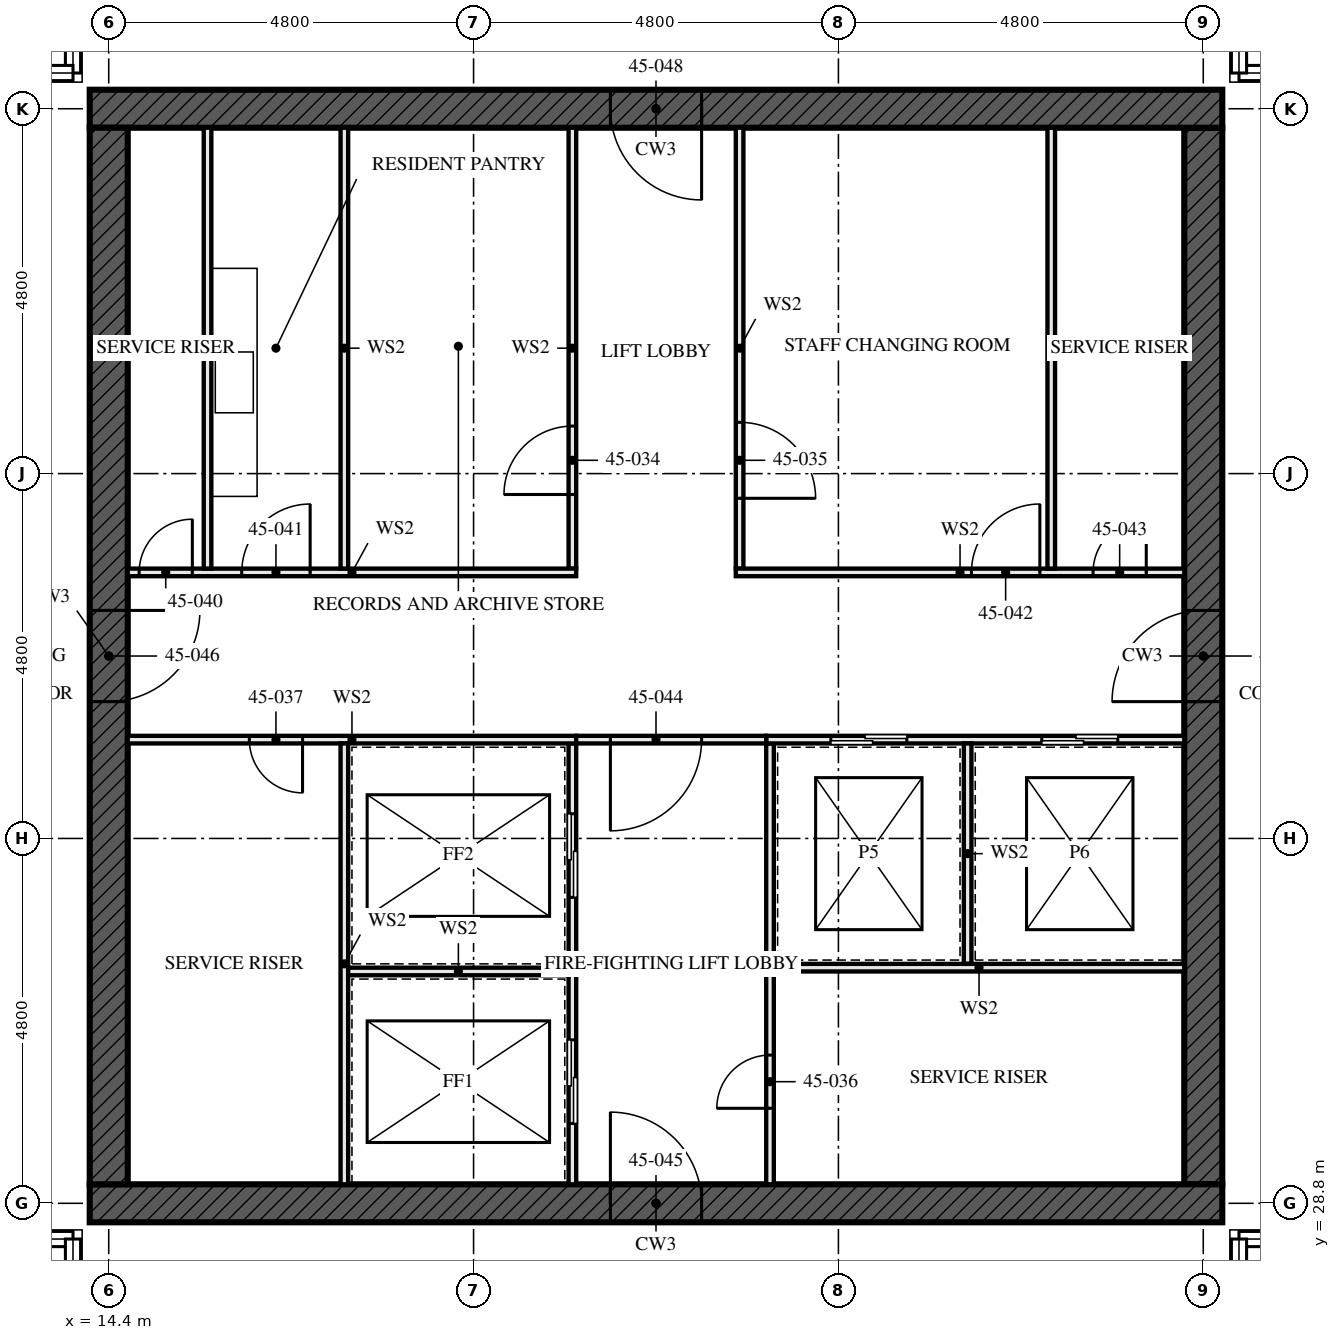
"""IFC4 building model, lengths in metres.
Left out: names, types, materials, properties, quantities, classifications, styles, units other than length and angle.
Written with IfcOpenShell. Run it as: python <this file> out.ifc"""

import sys

from ifc_helpers import new_model, si_unit, direction, frame, frame_2d, origin, place, context, subcontext, project, spatial, rectangle, extrude, element, fill, save


model = new_model("IFC4")
c1 = context("Model", 3, precision=1e-05, world=origin(), true_north=direction((0.0, 1.0)))
c2 = subcontext(c1, "Body", "Model", "MODEL_VIEW")
j1 = project(units=[si_unit("LENGTHUNIT", "METRE"), si_unit("PLANEANGLEUNIT", "RADIAN")], contexts=[c1])
p1 = place(None, origin())
s1 = spatial("IfcSite", under=j1, at=p1, CompositionType="ELEMENT")
p2 = place(p1, origin())
s2 = spatial("IfcBuilding", under=s1, at=p2, CompositionType="ELEMENT")
p3 = place(p2, frame((0.0, 0.0, 165.5)))
s3 = spatial("IfcBuildingStorey", under=s2, at=p3, CompositionType="ELEMENT", Elevation=165.5)
p4 = place(p3, frame((14.15, 28.8, -0.17), z_axis=(0.0, 0.0, 1.0), x_axis=(1.0, 0.0, 0.0)))
e1 = element("IfcWall", 1, at=p4, inside=s3, PredefinedType="SHEAR", context=c2, shape_type="SweptSolid", body=[
    extrude(rectangle(XDim=14.9, YDim=0.5, at=frame_2d((7.45, 0.0))), origin(), (0.0, 0.0, 1.0), 3.5),
])
p5 = place(p4, frame((6.85, 0.0, 0.17)))
e2 = element("IfcOpeningElement", 2, at=p5, cuts=e1, PredefinedType="OPENING", context=c2, shape_type="SweptSolid", body=[
    extrude(rectangle(XDim=1.2, YDim=2.1, at=frame_2d((0.6, 1.05))), frame((0.0, 0.26, 0.0), z_axis=(0.0, -1.0, 0.0), x_axis=(1.0, 0.0, 0.0)), (0.0, 0.0, 1.0), 0.521),
])
p6 = place(p3, frame((29.05, 43.2, -0.17), z_axis=(0.0, 0.0, 1.0), x_axis=(-1.0, 0.0, 0.0)))
e3 = element("IfcWall", 3, at=p6, inside=s3, PredefinedType="SHEAR", context=c2, shape_type="SweptSolid", body=[
    extrude(rectangle(XDim=14.9, YDim=0.5, at=frame_2d((7.45, 0.0))), origin(), (0.0, 0.0, 1.0), 3.5),
])
p7 = place(p6, frame((6.85, 0.0, 0.17)))
e4 = element("IfcOpeningElement", 4, at=p7, cuts=e3, PredefinedType="OPENING", context=c2, shape_type="SweptSolid", body=[
    extrude(rectangle(XDim=1.2, YDim=2.1, at=frame_2d((0.6, 1.05))), frame((0.0, 0.26, 0.0), z_axis=(0.0, -1.0, 0.0), x_axis=(1.0, 0.0, 0.0)), (0.0, 0.0, 1.0), 0.521),
])
p8 = place(p3, frame((14.4, 42.95, -0.17), z_axis=(0.0, 0.0, 1.0), x_axis=(0.0, -1.0, 0.0)))
e5 = element("IfcWall", 5, at=p8, inside=s3, PredefinedType="SHEAR", context=c2, shape_type="SweptSolid", body=[
    extrude(rectangle(XDim=13.9, YDim=0.5, at=frame_2d((6.95, 0.0))), origin(), (0.0, 0.0, 1.0), 3.5),
])
p9 = place(p8, frame((6.35, 0.0, 0.17)))
e6 = element("IfcOpeningElement", 6, at=p9, cuts=e5, PredefinedType="OPENING", context=c2, shape_type="SweptSolid", body=[
    extrude(rectangle(XDim=1.2, YDim=2.1, at=frame_2d((0.6, 1.05))), frame((0.0, 0.26, 0.0), z_axis=(0.0, -1.0, 0.0), x_axis=(1.0, 0.0, 0.0)), (0.0, 0.0, 1.0), 0.521),
])
p10 = place(p3, frame((28.8, 29.05, -0.17), z_axis=(0.0, 0.0, 1.0), x_axis=(0.0, 1.0, 0.0)))
e7 = element("IfcWall", 7, at=p10, inside=s3, PredefinedType="SHEAR", context=c2, shape_type="SweptSolid", body=[
    extrude(rectangle(XDim=13.9, YDim=0.5, at=frame_2d((6.95, 0.0))), origin(), (0.0, 0.0, 1.0), 3.5),
])
p11 = place(p10, frame((6.35, 0.0, 0.17)))
e8 = element("IfcOpeningElement", 8, at=p11, cuts=e7, PredefinedType="OPENING", context=c2, shape_type="SweptSolid", body=[
    extrude(rectangle(XDim=1.2, YDim=2.1, at=frame_2d((0.6, 1.05))), frame((0.0, 0.26, 0.0), z_axis=(0.0, -1.0, 0.0), x_axis=(1.0, 0.0, 0.0)), (0.0, 0.0, 1.0), 0.521),
])
for number, where, z_axis, x_axis in (
    (9, (15.7, 37.15, 0.0), (0.0, 0.0, 1.0), (0.0, 1.0, 0.0)),
    (10, (26.8, 37.15, 0.0), (0.0, 0.0, 1.0), (0.0, 1.0, 0.0)),
):
    element("IfcWall", number, at=place(p3, frame(where, z_axis=z_axis, x_axis=x_axis)), inside=s3, PredefinedType="SOLIDWALL", context=c2, shape_type="SweptSolid", body=[
        extrude(rectangle(XDim=5.8, YDim=0.1, at=frame_2d((2.9, 0.0))), origin(), (0.0, 0.0, 1.0), 3.33),
    ])
p12 = place(p3, frame((20.5, 29.05, 0.0), z_axis=(0.0, 0.0, 1.0), x_axis=(0.0, 1.0, 0.0)))
e11 = element("IfcWall", 11, at=p12, inside=s3, PredefinedType="SOLIDWALL", context=c2, shape_type="SweptSolid", body=[
    extrude(rectangle(XDim=5.8, YDim=0.1, at=frame_2d((2.9, 0.0))), origin(), (0.0, 0.0, 1.0), 3.33),
])
p13 = place(p12, frame((0.8, 0.0, 0.0)))
e12 = element("IfcOpeningElement", 12, at=p13, cuts=e11, PredefinedType="OPENING", context=c2, shape_type="SweptSolid", body=[
    extrude(rectangle(XDim=1.1, YDim=2.3, at=frame_2d((0.55, 1.15))), frame((0.0, 0.061, 0.0), z_axis=(0.0, -1.0, 0.0), x_axis=(1.0, 0.0, 0.0)), (0.0, 0.0, 1.0), 0.121),
])
p14 = place(p12, frame((3.775, 0.0, 0.0)))
e13 = element("IfcOpeningElement", 13, at=p14, cuts=e11, PredefinedType="OPENING", context=c2, shape_type="SweptSolid", body=[
    extrude(rectangle(XDim=1.1, YDim=2.3, at=frame_2d((0.55, 1.15))), frame((0.0, 0.061, 0.0), z_axis=(0.0, -1.0, 0.0), x_axis=(1.0, 0.0, 0.0)), (0.0, 0.0, 1.0), 0.121),
])
p15 = place(p3, frame((20.5, 37.15, 0.0), z_axis=(0.0, 0.0, 1.0), x_axis=(0.0, 1.0, 0.0)))
e14 = element("IfcWall", 14, at=p15, inside=s3, PredefinedType="SOLIDWALL", context=c2, shape_type="SweptSolid", body=[
    extrude(rectangle(XDim=5.8, YDim=0.1, at=frame_2d((2.9, 0.0))), origin(), (0.0, 0.0, 1.0), 3.33),
])
p16 = place(p15, frame((0.975, 0.0, 0.0)))
e15 = element("IfcOpeningElement", 15, at=p16, cuts=e14, PredefinedType="OPENING", context=c2, shape_type="SweptSolid", body=[
    extrude(rectangle(XDim=0.9, YDim=2.1, at=frame_2d((0.45, 1.05))), frame((0.0, 0.061, 0.0), z_axis=(0.0, -1.0, 0.0), x_axis=(1.0, 0.0, 0.0)), (0.0, 0.0, 1.0), 0.121),
])
p17 = place(p3, frame((22.7, 37.15, 0.0), z_axis=(0.0, 0.0, 1.0), x_axis=(0.0, 1.0, 0.0)))
e16 = element("IfcWall", 16, at=p17, inside=s3, PredefinedType="SOLIDWALL", context=c2, shape_type="SweptSolid", body=[
    extrude(rectangle(XDim=5.8, YDim=0.1, at=frame_2d((2.9, 0.0))), origin(), (0.0, 0.0, 1.0), 3.33),
])
p18 = place(p17, frame((0.925, 0.0, 0.0)))
e17 = element("IfcOpeningElement", 17, at=p18, cuts=e16, PredefinedType="OPENING", context=c2, shape_type="SweptSolid", body=[
    extrude(rectangle(XDim=1.0, YDim=2.1, at=frame_2d((0.5, 1.05))), frame((0.0, 0.061, 0.0), z_axis=(0.0, -1.0, 0.0), x_axis=(1.0, 0.0, 0.0)), (0.0, 0.0, 1.0), 0.121),
])
p19 = place(p3, frame((23.1, 29.05, 0.0), z_axis=(0.0, 0.0, 1.0), x_axis=(0.0, 1.0, 0.0)))
e18 = element("IfcWall", 18, at=p19, inside=s3, PredefinedType="SOLIDWALL", context=c2, shape_type="SweptSolid", body=[
    extrude(rectangle(XDim=5.8, YDim=0.1, at=frame_2d((2.9, 0.0))), origin(), (0.0, 0.0, 1.0), 3.33),
])
p20 = place(p19, frame((1.0, 0.0, 0.0)))
e19 = element("IfcOpeningElement", 19, at=p20, cuts=e18, PredefinedType="OPENING", context=c2, shape_type="SweptSolid", body=[
    extrude(rectangle(XDim=0.7, YDim=2.1, at=frame_2d((0.35, 1.05))), frame((0.0, 0.061, 0.0), z_axis=(0.0, -1.0, 0.0), x_axis=(1.0, 0.0, 0.0)), (0.0, 0.0, 1.0), 0.121),
])
p21 = place(p3, frame((14.65, 34.9, 0.0), z_axis=(0.0, 0.0, 1.0), x_axis=(1.0, 0.0, 0.0)))
e20 = element("IfcWall", 20, at=p21, inside=s3, PredefinedType="SOLIDWALL", context=c2, shape_type="SweptSolid", body=[
    extrude(rectangle(XDim=5.9, YDim=0.1, at=frame_2d((2.95, 0.0))), origin(), (0.0, 0.0, 1.0), 3.33),
])
p22 = place(p21, frame((1.6, 0.0, 0.0)))
e21 = element("IfcOpeningElement", 21, at=p22, cuts=e20, PredefinedType="OPENING", context=c2, shape_type="SweptSolid", body=[
    extrude(rectangle(XDim=0.7, YDim=2.1, at=frame_2d((0.35, 1.05))), frame((0.0, 0.061, 0.0), z_axis=(0.0, -1.0, 0.0), x_axis=(1.0, 0.0, 0.0)), (0.0, 0.0, 1.0), 0.121),
])
p23 = place(p3, frame((23.05, 34.9, 0.0), z_axis=(0.0, 0.0, 1.0), x_axis=(1.0, 0.0, 0.0)))
e22 = element("IfcWall", 22, at=p23, inside=s3, PredefinedType="SOLIDWALL", context=c2, shape_type="SweptSolid", body=[
    extrude(rectangle(XDim=5.5, YDim=0.1, at=frame_2d((2.75, 0.0))), origin(), (0.0, 0.0, 1.0), 3.33),
])
p24 = place(p23, frame((0.85, 0.0, 0.0)))
e23 = element("IfcOpeningElement", 23, at=p24, cuts=e22, PredefinedType="OPENING", context=c2, shape_type="SweptSolid", body=[
    extrude(rectangle(XDim=1.0, YDim=2.1, at=frame_2d((0.5, 1.05))), frame((0.0, 0.061, 0.0), z_axis=(0.0, -1.0, 0.0), x_axis=(1.0, 0.0, 0.0)), (0.0, 0.0, 1.0), 0.121),
])
p25 = place(p23, frame((3.625, 0.0, 0.0)))
e24 = element("IfcOpeningElement", 24, at=p25, cuts=e22, PredefinedType="OPENING", context=c2, shape_type="SweptSolid", body=[
    extrude(rectangle(XDim=1.0, YDim=2.1, at=frame_2d((0.5, 1.05))), frame((0.0, 0.061, 0.0), z_axis=(0.0, -1.0, 0.0), x_axis=(1.0, 0.0, 0.0)), (0.0, 0.0, 1.0), 0.121),
])
p26 = place(p3, frame((14.65, 37.1, 0.0), z_axis=(0.0, 0.0, 1.0), x_axis=(1.0, 0.0, 0.0)))
e25 = element("IfcWall", 25, at=p26, inside=s3, PredefinedType="SOLIDWALL", context=c2, shape_type="SweptSolid", body=[
    extrude(rectangle(XDim=5.9, YDim=0.1, at=frame_2d((2.95, 0.0))), origin(), (0.0, 0.0, 1.0), 3.33),
])
p27 = place(p26, frame((0.15, 0.0, 0.0)))
e26 = element("IfcOpeningElement", 26, at=p27, cuts=e25, PredefinedType="OPENING", context=c2, shape_type="SweptSolid", body=[
    extrude(rectangle(XDim=0.7, YDim=2.1, at=frame_2d((0.35, 1.05))), frame((0.0, 0.061, 0.0), z_axis=(0.0, -1.0, 0.0), x_axis=(1.0, 0.0, 0.0)), (0.0, 0.0, 1.0), 0.121),
])
p28 = place(p26, frame((1.5, 0.0, 0.0)))
e27 = element("IfcOpeningElement", 27, at=p28, cuts=e25, PredefinedType="OPENING", context=c2, shape_type="SweptSolid", body=[
    extrude(rectangle(XDim=0.9, YDim=2.1, at=frame_2d((0.45, 1.05))), frame((0.0, 0.061, 0.0), z_axis=(0.0, -1.0, 0.0), x_axis=(1.0, 0.0, 0.0)), (0.0, 0.0, 1.0), 0.121),
])
p29 = place(p3, frame((22.65, 37.1, 0.0), z_axis=(0.0, 0.0, 1.0), x_axis=(1.0, 0.0, 0.0)))
e28 = element("IfcWall", 28, at=p29, inside=s3, PredefinedType="SOLIDWALL", context=c2, shape_type="SweptSolid", body=[
    extrude(rectangle(XDim=5.9, YDim=0.1, at=frame_2d((2.95, 0.0))), origin(), (0.0, 0.0, 1.0), 3.33),
])
p30 = place(p29, frame((3.1, 0.0, 0.0)))
e29 = element("IfcOpeningElement", 29, at=p30, cuts=e28, PredefinedType="OPENING", context=c2, shape_type="SweptSolid", body=[
    extrude(rectangle(XDim=0.9, YDim=2.1, at=frame_2d((0.45, 1.05))), frame((0.0, 0.061, 0.0), z_axis=(0.0, -1.0, 0.0), x_axis=(1.0, 0.0, 0.0)), (0.0, 0.0, 1.0), 0.121),
])
p31 = place(p29, frame((4.7, 0.0, 0.0)))
e30 = element("IfcOpeningElement", 30, at=p31, cuts=e28, PredefinedType="OPENING", context=c2, shape_type="SweptSolid", body=[
    extrude(rectangle(XDim=0.7, YDim=2.1, at=frame_2d((0.35, 1.05))), frame((0.0, 0.061, 0.0), z_axis=(0.0, -1.0, 0.0), x_axis=(1.0, 0.0, 0.0)), (0.0, 0.0, 1.0), 0.121),
])
p32 = place(p3, frame((20.55, 34.9, 0.0), z_axis=(0.0, 0.0, 1.0), x_axis=(1.0, 0.0, 0.0)))
e31 = element("IfcWall", 31, at=p32, inside=s3, PredefinedType="SOLIDWALL", context=c2, shape_type="SweptSolid", body=[
    extrude(rectangle(XDim=2.5, YDim=0.1, at=frame_2d((1.25, 0.0))), origin(), (0.0, 0.0, 1.0), 3.33),
])
p33 = place(p32, frame((0.45, 0.0, 0.0)))
e32 = element("IfcOpeningElement", 32, at=p33, cuts=e31, PredefinedType="OPENING", context=c2, shape_type="SweptSolid", body=[
    extrude(rectangle(XDim=1.2, YDim=2.1, at=frame_2d((0.6, 1.05))), frame((0.0, 0.061, 0.0), z_axis=(0.0, -1.0, 0.0), x_axis=(1.0, 0.0, 0.0)), (0.0, 0.0, 1.0), 0.121),
])
p34 = place(p3, frame((17.5, 29.05, 0.0), z_axis=(0.0, 0.0, 1.0), x_axis=(0.0, 1.0, 0.0)))
e33 = element("IfcWall", 33, at=p34, inside=s3, PredefinedType="SOLIDWALL", context=c2, shape_type="SweptSolid", body=[
    extrude(rectangle(XDim=5.8, YDim=0.1, at=frame_2d((2.9, 0.0))), origin(), (0.0, 0.0, 1.0), 3.33),
])
p35 = place(p3, frame((17.55, 31.85, 0.0), z_axis=(0.0, 0.0, 1.0), x_axis=(1.0, 0.0, 0.0)))
e34 = element("IfcWall", 34, at=p35, inside=s3, PredefinedType="SOLIDWALL", context=c2, shape_type="SweptSolid", body=[
    extrude(rectangle(XDim=2.9, YDim=0.1, at=frame_2d((1.45, 0.0))), origin(), (0.0, 0.0, 1.0), 3.33),
])
p36 = place(p3, frame((17.5, 37.15, 0.0), z_axis=(0.0, 0.0, 1.0), x_axis=(0.0, 1.0, 0.0)))
e35 = element("IfcWall", 35, at=p36, inside=s3, PredefinedType="SOLIDWALL", context=c2, shape_type="SweptSolid", body=[
    extrude(rectangle(XDim=5.8, YDim=0.1, at=frame_2d((2.9, 0.0))), origin(), (0.0, 0.0, 1.0), 3.33),
])
p37 = place(p3, frame((25.7, 31.95, 0.0), z_axis=(0.0, 0.0, 1.0), x_axis=(0.0, 1.0, 0.0)))
e36 = element("IfcWall", 36, at=p37, inside=s3, PredefinedType="SOLIDWALL", context=c2, shape_type="SweptSolid", body=[
    extrude(rectangle(XDim=2.9, YDim=0.1, at=frame_2d((1.45, 0.0))), origin(), (0.0, 0.0, 1.0), 3.33),
])
p38 = place(p3, frame((23.15, 31.9, 0.0), z_axis=(0.0, 0.0, 1.0), x_axis=(1.0, 0.0, 0.0)))
e37 = element("IfcWall", 37, at=p38, inside=s3, PredefinedType="SOLIDWALL", context=c2, shape_type="SweptSolid", body=[
    extrude(rectangle(XDim=5.4, YDim=0.1, at=frame_2d((2.7, 0.0))), origin(), (0.0, 0.0, 1.0), 3.33),
])
p39 = place(p13, origin())
e38 = element("IfcDoor", 38, at=p39, inside=s3, OperationType="SLIDING_TO_LEFT", PredefinedType="DOOR", context=c2, shape_type="SweptSolid", body=[
    extrude(rectangle(XDim=1.1, YDim=2.3, at=frame_2d((0.55, 1.15))), frame((0.0, 0.05, 0.0), z_axis=(0.0, -1.0, 0.0), x_axis=(1.0, 0.0, 0.0)), (0.0, 0.0, 1.0), 0.1),
])
fill(e12, e38)
p40 = place(p14, origin())
e39 = element("IfcDoor", 39, at=p40, inside=s3, OperationType="SLIDING_TO_LEFT", PredefinedType="DOOR", context=c2, shape_type="SweptSolid", body=[
    extrude(rectangle(XDim=1.1, YDim=2.3, at=frame_2d((0.55, 1.15))), frame((0.0, 0.05, 0.0), z_axis=(0.0, -1.0, 0.0), x_axis=(1.0, 0.0, 0.0)), (0.0, 0.0, 1.0), 0.1),
])
fill(e13, e39)
p41 = place(p16, origin())
e40 = element("IfcDoor", 40, at=p41, inside=s3, OperationType="SINGLE_SWING_RIGHT", PredefinedType="DOOR", context=c2, shape_type="SweptSolid", body=[
    extrude(rectangle(XDim=0.9, YDim=2.1, at=frame_2d((0.45, 1.05))), frame((0.0, 0.027, 0.0), z_axis=(0.0, -1.0, 0.0), x_axis=(1.0, 0.0, 0.0)), (0.0, 0.0, 1.0), 0.054),
])
fill(e15, e40)
p42 = place(p18, frame((1.0, 0.0, 0.0), z_axis=(0.0, 0.0, 1.0), x_axis=(-1.0, 0.0, 0.0)))
e41 = element("IfcDoor", 41, at=p42, inside=s3, OperationType="SINGLE_SWING_LEFT", PredefinedType="DOOR", context=c2, shape_type="SweptSolid", body=[
    extrude(rectangle(XDim=1.0, YDim=2.1, at=frame_2d((0.5, 1.05))), frame((0.0, 0.027, 0.0), z_axis=(0.0, -1.0, 0.0), x_axis=(1.0, 0.0, 0.0)), (0.0, 0.0, 1.0), 0.054),
])
fill(e17, e41)
p43 = place(p20, origin())
e42 = element("IfcDoor", 42, at=p43, inside=s3, OperationType="SINGLE_SWING_RIGHT", PredefinedType="DOOR", context=c2, shape_type="SweptSolid", body=[
    extrude(rectangle(XDim=0.7, YDim=2.1, at=frame_2d((0.35, 1.05))), frame((0.0, 0.027, 0.0), z_axis=(0.0, -1.0, 0.0), x_axis=(1.0, 0.0, 0.0)), (0.0, 0.0, 1.0), 0.054),
])
fill(e19, e42)
p44 = place(p22, frame((0.7, 0.0, 0.0), z_axis=(0.0, 0.0, 1.0), x_axis=(-1.0, 0.0, 0.0)))
e43 = element("IfcDoor", 43, at=p44, inside=s3, OperationType="SINGLE_SWING_RIGHT", PredefinedType="DOOR", context=c2, shape_type="SweptSolid", body=[
    extrude(rectangle(XDim=0.7, YDim=2.1, at=frame_2d((0.35, 1.05))), frame((0.0, 0.027, 0.0), z_axis=(0.0, -1.0, 0.0), x_axis=(1.0, 0.0, 0.0)), (0.0, 0.0, 1.0), 0.054),
])
fill(e21, e43)
p45 = place(p24, origin())
e44 = element("IfcDoor", 44, at=p45, inside=s3, OperationType="SLIDING_TO_LEFT", PredefinedType="DOOR", context=c2, shape_type="SweptSolid", body=[
    extrude(rectangle(XDim=1.0, YDim=2.1, at=frame_2d((0.5, 1.05))), frame((0.0, 0.05, 0.0), z_axis=(0.0, -1.0, 0.0), x_axis=(1.0, 0.0, 0.0)), (0.0, 0.0, 1.0), 0.1),
])
fill(e23, e44)
p46 = place(p25, origin())
e45 = element("IfcDoor", 45, at=p46, inside=s3, OperationType="SLIDING_TO_LEFT", PredefinedType="DOOR", context=c2, shape_type="SweptSolid", body=[
    extrude(rectangle(XDim=1.0, YDim=2.1, at=frame_2d((0.5, 1.05))), frame((0.0, 0.05, 0.0), z_axis=(0.0, -1.0, 0.0), x_axis=(1.0, 0.0, 0.0)), (0.0, 0.0, 1.0), 0.1),
])
fill(e24, e45)
p47 = place(p27, origin())
e46 = element("IfcDoor", 46, at=p47, inside=s3, OperationType="SINGLE_SWING_LEFT", PredefinedType="DOOR", context=c2, shape_type="SweptSolid", body=[
    extrude(rectangle(XDim=0.7, YDim=2.1, at=frame_2d((0.35, 1.05))), frame((0.0, 0.027, 0.0), z_axis=(0.0, -1.0, 0.0), x_axis=(1.0, 0.0, 0.0)), (0.0, 0.0, 1.0), 0.054),
])
fill(e26, e46)
p48 = place(p28, origin())
e47 = element("IfcDoor", 47, at=p48, inside=s3, OperationType="SINGLE_SWING_LEFT", PredefinedType="DOOR", context=c2, shape_type="SweptSolid", body=[
    extrude(rectangle(XDim=0.9, YDim=2.1, at=frame_2d((0.45, 1.05))), frame((0.0, 0.027, 0.0), z_axis=(0.0, -1.0, 0.0), x_axis=(1.0, 0.0, 0.0)), (0.0, 0.0, 1.0), 0.054),
])
fill(e27, e47)
p49 = place(p30, origin())
e48 = element("IfcDoor", 48, at=p49, inside=s3, OperationType="SINGLE_SWING_LEFT", PredefinedType="DOOR", context=c2, shape_type="SweptSolid", body=[
    extrude(rectangle(XDim=0.9, YDim=2.1, at=frame_2d((0.45, 1.05))), frame((0.0, 0.027, 0.0), z_axis=(0.0, -1.0, 0.0), x_axis=(1.0, 0.0, 0.0)), (0.0, 0.0, 1.0), 0.054),
])
fill(e29, e48)
p50 = place(p31, origin())
e49 = element("IfcDoor", 49, at=p50, inside=s3, OperationType="SINGLE_SWING_LEFT", PredefinedType="DOOR", context=c2, shape_type="SweptSolid", body=[
    extrude(rectangle(XDim=0.7, YDim=2.1, at=frame_2d((0.35, 1.05))), frame((0.0, 0.027, 0.0), z_axis=(0.0, -1.0, 0.0), x_axis=(1.0, 0.0, 0.0)), (0.0, 0.0, 1.0), 0.054),
])
fill(e30, e49)
p51 = place(p33, frame((1.2, 0.0, 0.0), z_axis=(0.0, 0.0, 1.0), x_axis=(-1.0, 0.0, 0.0)))
e50 = element("IfcDoor", 50, at=p51, inside=s3, OperationType="SINGLE_SWING_LEFT", PredefinedType="DOOR", context=c2, shape_type="SweptSolid", body=[
    extrude(rectangle(XDim=1.2, YDim=2.1, at=frame_2d((0.6, 1.05))), frame((0.0, 0.027, 0.0), z_axis=(0.0, -1.0, 0.0), x_axis=(1.0, 0.0, 0.0)), (0.0, 0.0, 1.0), 0.054),
])
fill(e32, e50)
p52 = place(p5, origin())
e51 = element("IfcDoor", 51, at=p52, inside=s3, OperationType="SINGLE_SWING_LEFT", PredefinedType="DOOR", context=c2, shape_type="SweptSolid", body=[
    extrude(rectangle(XDim=1.2, YDim=2.1, at=frame_2d((0.6, 1.05))), frame((0.0, 0.027, 0.0), z_axis=(0.0, -1.0, 0.0), x_axis=(1.0, 0.0, 0.0)), (0.0, 0.0, 1.0), 0.054),
])
fill(e2, e51)
p53 = place(p9, origin())
e52 = element("IfcDoor", 52, at=p53, inside=s3, OperationType="SINGLE_SWING_LEFT", PredefinedType="DOOR", context=c2, shape_type="SweptSolid", body=[
    extrude(rectangle(XDim=1.2, YDim=2.1, at=frame_2d((0.6, 1.05))), frame((0.0, 0.027, 0.0), z_axis=(0.0, -1.0, 0.0), x_axis=(1.0, 0.0, 0.0)), (0.0, 0.0, 1.0), 0.054),
])
fill(e6, e52)
p54 = place(p11, origin())
e53 = element("IfcDoor", 53, at=p54, inside=s3, OperationType="SINGLE_SWING_LEFT", PredefinedType="DOOR", context=c2, shape_type="SweptSolid", body=[
    extrude(rectangle(XDim=1.2, YDim=2.1, at=frame_2d((0.6, 1.05))), frame((0.0, 0.027, 0.0), z_axis=(0.0, -1.0, 0.0), x_axis=(1.0, 0.0, 0.0)), (0.0, 0.0, 1.0), 0.054),
])
fill(e8, e53)
p55 = place(p7, origin())
e54 = element("IfcDoor", 54, at=p55, inside=s3, OperationType="SINGLE_SWING_LEFT", PredefinedType="DOOR", context=c2, shape_type="SweptSolid", body=[
    extrude(rectangle(XDim=1.2, YDim=2.1, at=frame_2d((0.6, 1.05))), frame((0.0, 0.027, 0.0), z_axis=(0.0, -1.0, 0.0), x_axis=(1.0, 0.0, 0.0)), (0.0, 0.0, 1.0), 0.054),
])
fill(e4, e54)
save(model, sys.argv[1])
